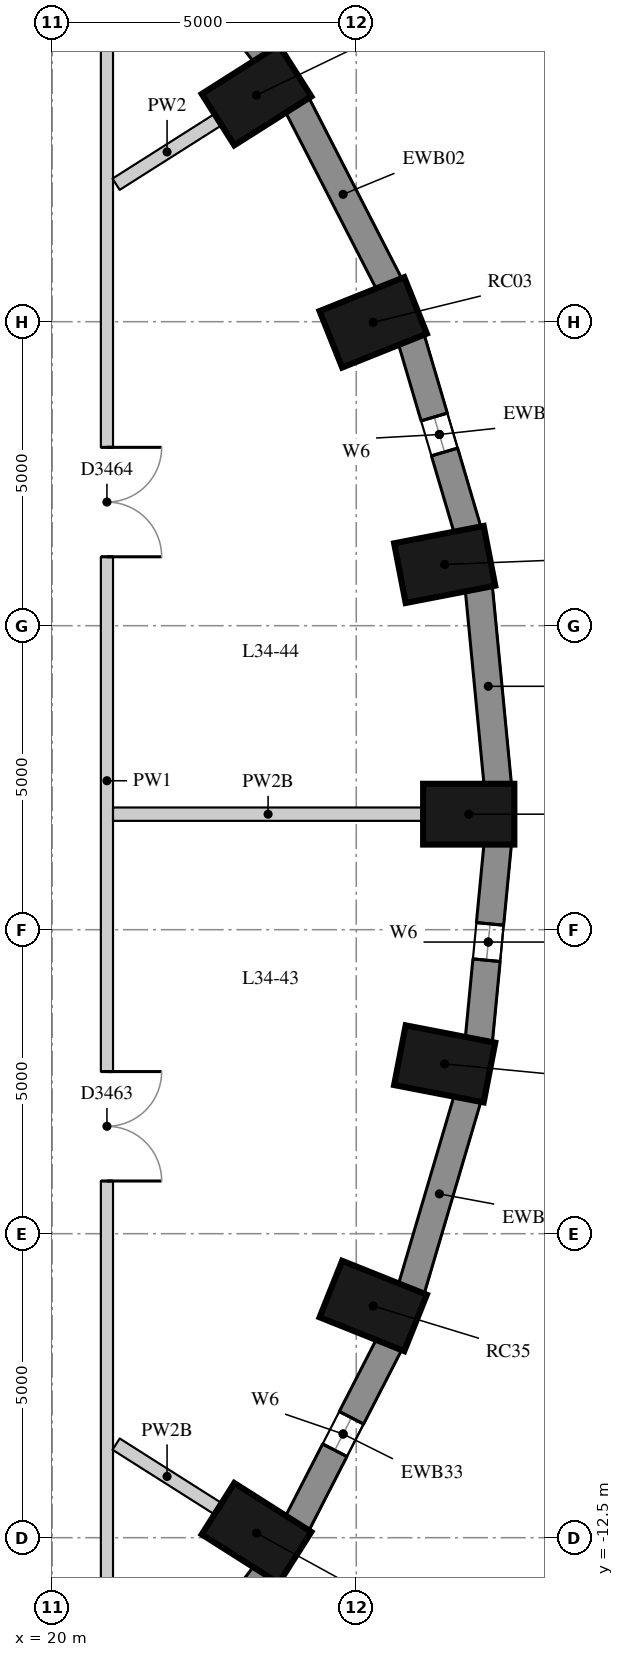
"""IFC4 building model, lengths in metres.
Left out: names, types, materials, properties, quantities, classifications, styles, units other than length and angle.
Written with IfcOpenShell. Run it as: python <this file> out.ifc"""

import sys

from ifc_helpers import new_model, si_unit, direction, frame, frame_2d, origin, origin_2d, place, context, subcontext, project, spatial, rectangle, extrude, element, fill, save


model = new_model("IFC4")
c1 = context("Model", 3, precision=1e-05, world=origin(), true_north=direction((0.0, 1.0)))
c2 = subcontext(c1, "Body", "Model", "MODEL_VIEW")
j1 = project(units=[si_unit("LENGTHUNIT", "METRE"), si_unit("PLANEANGLEUNIT", "RADIAN")], contexts=[c1])
p1 = place(None, origin())
s1 = spatial("IfcSite", under=j1, at=p1, CompositionType="ELEMENT")
p2 = place(p1, origin())
s2 = spatial("IfcBuilding", under=s1, at=p2, CompositionType="ELEMENT")
p3 = place(p2, frame((0.0, 0.0, 121.9)))
s3 = spatial("IfcBuildingStorey", under=s2, at=p3, CompositionType="ELEMENT", Elevation=121.9)
for number, where, z_axis, x_axis in (
    (1, (26.85, -0.6, 0.0), (0.0, 0.0, 1.0), (1.0, 0.0, 0.0)),
    (2, (26.454, 3.507, 0.0), (0.0, 0.0, 1.0), (0.982, 0.19, 0.0)),
    (3, (25.279, 7.489, 0.0), (0.0, 0.0, 1.0), (0.929, 0.371, 0.0)),
    (4, (23.36, 11.225, 0.0), (0.0, 0.0, 1.0), (0.845, 0.536, 0.0)),
    (5, (23.36, -12.425, 0.0), (0.0, 0.0, 1.0), (0.845, -0.536, 0.0)),
    (6, (25.279, -8.689, 0.0), (0.0, 0.0, 1.0), (0.929, -0.371, 0.0)),
    (7, (26.454, -4.707, 0.0), (0.0, 0.0, 1.0), (0.982, -0.19, 0.0)),
):
    element("IfcColumn", number, at=place(p3, frame(where, z_axis=z_axis, x_axis=x_axis)), inside=s3, PredefinedType="COLUMN", context=c2, shape_type="SweptSolid", body=[
        extrude(rectangle(XDim=1.5, YDim=1.0, at=origin_2d()), origin(), (0.0, 0.0, 1.0), 3.3),
    ])
p4 = place(p3, frame((27.328, -0.12, 0.0), z_axis=(0.0, 0.0, 1.0), x_axis=(-0.09589355735, 0.995391594127, 0.0)))
e8 = element("IfcWall", 8, at=p4, inside=s3, PredefinedType="SOLIDWALL", context=c2, shape_type="SweptSolid", body=[
    extrude(rectangle(XDim=3.261, YDim=0.45, at=frame_2d((1.631, 0.0))), origin(), (0.0, 0.0, 1.0), 3.02),
])
p5 = place(p3, frame((26.832, 4.069, 0.0), z_axis=(0.0, 0.0, 1.0), x_axis=(-0.283002902729, 0.959119052593, 0.0)))
e9 = element("IfcWall", 9, at=p5, inside=s3, PredefinedType="SOLIDWALL", context=c2, shape_type="SweptSolid", body=[
    extrude(rectangle(XDim=3.286, YDim=0.45, at=frame_2d((1.643, 0.0))), origin(), (0.0, 0.0, 1.0), 3.02),
])
p6 = place(p5, frame((1.343, 0.0, 0.4)))
e10 = element("IfcOpeningElement", 10, at=p6, cuts=e9, PredefinedType="OPENING", context=c2, shape_type="SweptSolid", body=[
    extrude(rectangle(XDim=0.6, YDim=1.75, at=frame_2d((0.3, 0.875))), frame((0.0, 0.235, 0.0), z_axis=(0.0, -1.0, 0.0), x_axis=(1.0, 0.0, 0.0)), (0.0, 0.0, 1.0), 0.47),
])
p7 = place(p3, frame((25.545, 8.112, 0.0), z_axis=(0.0, 0.0, 1.0), x_axis=(-0.456828186229, 0.889554949549, 0.0)))
e11 = element("IfcWall", 11, at=p7, inside=s3, PredefinedType="SOLIDWALL", context=c2, shape_type="SweptSolid", body=[
    extrude(rectangle(XDim=3.333, YDim=0.45, at=frame_2d((1.667, 0.0))), origin(), (0.0, 0.0, 1.0), 3.02),
])
p8 = place(p3, frame((23.508, 11.887, 0.0), z_axis=(0.0, 0.0, 1.0), x_axis=(-0.610693945156, 0.791866721961, 0.0)))
e12 = element("IfcWall", 12, at=p8, inside=s3, PredefinedType="SOLIDWALL", context=c2, shape_type="SweptSolid", body=[
    extrude(rectangle(XDim=3.395, YDim=0.45, at=frame_2d((1.697, 0.0))), origin(), (0.0, 0.0, 1.0), 3.02),
])
p9 = place(p8, frame((1.397, 0.0, 0.4)))
e13 = element("IfcOpeningElement", 13, at=p9, cuts=e12, PredefinedType="OPENING", context=c2, shape_type="SweptSolid", body=[
    extrude(rectangle(XDim=0.6, YDim=1.75, at=frame_2d((0.3, 0.875))), frame((0.0, 0.235, 0.0), z_axis=(0.0, -1.0, 0.0), x_axis=(1.0, 0.0, 0.0)), (0.0, 0.0, 1.0), 0.47),
])
p10 = place(p3, frame((21.435, -15.775, 0.0), z_axis=(0.0, 0.0, 1.0), x_axis=(0.610693945156, 0.791866721961, 0.0)))
e14 = element("IfcWall", 14, at=p10, inside=s3, PredefinedType="SOLIDWALL", context=c2, shape_type="SweptSolid", body=[
    extrude(rectangle(XDim=3.395, YDim=0.45, at=frame_2d((1.697, 0.0))), origin(), (0.0, 0.0, 1.0), 3.02),
])
p11 = place(p3, frame((24.023, -12.277, 0.0), z_axis=(0.0, 0.0, 1.0), x_axis=(0.456828186229, 0.889554949549, 0.0)))
e15 = element("IfcWall", 15, at=p11, inside=s3, PredefinedType="SOLIDWALL", context=c2, shape_type="SweptSolid", body=[
    extrude(rectangle(XDim=3.333, YDim=0.45, at=frame_2d((1.667, 0.0))), origin(), (0.0, 0.0, 1.0), 3.02),
])
p12 = place(p11, frame((1.366, 0.0, 0.4)))
e16 = element("IfcOpeningElement", 16, at=p12, cuts=e15, PredefinedType="OPENING", context=c2, shape_type="SweptSolid", body=[
    extrude(rectangle(XDim=0.6, YDim=1.75, at=frame_2d((0.3, 0.875))), frame((0.0, 0.235, 0.0), z_axis=(0.0, -1.0, 0.0), x_axis=(1.0, 0.0, 0.0)), (0.0, 0.0, 1.0), 0.47),
])
p13 = place(p3, frame((25.902, -8.421, 0.0), z_axis=(0.0, 0.0, 1.0), x_axis=(0.282982737009, 0.95912500257, 0.0)))
e17 = element("IfcWall", 17, at=p13, inside=s3, PredefinedType="SOLIDWALL", context=c2, shape_type="SweptSolid", body=[
    extrude(rectangle(XDim=3.286, YDim=0.45, at=frame_2d((1.643, 0.0))), origin(), (0.0, 0.0, 1.0), 3.02),
])
p14 = place(p3, frame((27.015, -4.326, 0.0), z_axis=(0.0, 0.0, 1.0), x_axis=(0.09589355735, 0.995391594127, 0.0)))
e18 = element("IfcWall", 18, at=p14, inside=s3, PredefinedType="SOLIDWALL", context=c2, shape_type="SweptSolid", body=[
    extrude(rectangle(XDim=3.261, YDim=0.45, at=frame_2d((1.631, 0.0))), origin(), (0.0, 0.0, 1.0), 3.02),
])
p15 = place(p14, frame((1.331, 0.0, 0.4)))
e19 = element("IfcOpeningElement", 19, at=p15, cuts=e18, PredefinedType="OPENING", context=c2, shape_type="SweptSolid", body=[
    extrude(rectangle(XDim=0.6, YDim=1.75, at=frame_2d((0.3, 0.875))), frame((0.0, 0.235, 0.0), z_axis=(0.0, -1.0, 0.0), x_axis=(1.0, 0.0, 0.0)), (0.0, 0.0, 1.0), 0.47),
])
p16 = place(p3, frame((20.9, 13.6, 0.0), z_axis=(0.0, 0.0, 1.0), x_axis=(0.0, -1.0, 0.0)))
e20 = element("IfcWall", 20, at=p16, inside=s3, PredefinedType="PARTITIONING", context=c2, shape_type="SweptSolid", body=[
    extrude(rectangle(XDim=27.3, YDim=0.2, at=frame_2d((13.65, 0.0))), origin(), (0.0, 0.0, 1.0), 3.02),
])
p17 = place(p16, frame((18.433, 0.0, 0.0)))
e21 = element("IfcOpeningElement", 21, at=p17, cuts=e20, PredefinedType="OPENING", context=c2, shape_type="SweptSolid", body=[
    extrude(rectangle(XDim=1.8, YDim=2.1, at=frame_2d((0.9, 1.05))), frame((0.0, 0.11, 0.0), z_axis=(0.0, -1.0, 0.0), x_axis=(1.0, 0.0, 0.0)), (0.0, 0.0, 1.0), 0.22),
])
p18 = place(p16, frame((8.167, 0.0, 0.0)))
e22 = element("IfcOpeningElement", 22, at=p18, cuts=e20, PredefinedType="OPENING", context=c2, shape_type="SweptSolid", body=[
    extrude(rectangle(XDim=1.8, YDim=2.1, at=frame_2d((0.9, 1.05))), frame((0.0, 0.11, 0.0), z_axis=(0.0, -1.0, 0.0), x_axis=(1.0, 0.0, 0.0)), (0.0, 0.0, 1.0), 0.22),
])
p19 = place(p3, frame((26.1, -0.6, 0.0), z_axis=(0.0, 0.0, 1.0), x_axis=(-1.0, 0.0, 0.0)))
e23 = element("IfcWall", 23, at=p19, inside=s3, PredefinedType="PARTITIONING", context=c2, shape_type="SweptSolid", body=[
    extrude(rectangle(XDim=5.1, YDim=0.22, at=frame_2d((2.55, 0.0))), origin(), (0.0, 0.0, 1.0), 2.57),
])
p20 = place(p3, frame((22.727, 10.823, 0.0), z_axis=(0.0, 0.0, 1.0), x_axis=(-0.844587282199, -0.535417895431, 0.0)))
e24 = element("IfcWall", 24, at=p20, inside=s3, PredefinedType="PARTITIONING", context=c2, shape_type="SweptSolid", body=[
    extrude(rectangle(XDim=1.984, YDim=0.22, at=frame_2d((0.992, 0.0))), origin(), (0.0, 0.0, 1.0), 3.02),
])
p21 = place(p3, frame((22.727, -12.023, 0.0), z_axis=(0.0, 0.0, 1.0), x_axis=(-0.84453164716, 0.535505646044, 0.0)))
e25 = element("IfcWall", 25, at=p21, inside=s3, PredefinedType="PARTITIONING", context=c2, shape_type="SweptSolid", body=[
    extrude(rectangle(XDim=1.985, YDim=0.22, at=frame_2d((0.992, 0.0))), origin(), (0.0, 0.0, 1.0), 2.57),
])
p22 = place(p6, origin())
e26 = element("IfcWindow", 26, at=p22, inside=s3, PartitioningType="SINGLE_PANEL", PredefinedType="WINDOW", context=c2, shape_type="SweptSolid", body=[
    extrude(rectangle(XDim=0.6, YDim=1.75, at=frame_2d((0.3, 0.875))), frame((0.0, 0.035, 0.0), z_axis=(0.0, -1.0, 0.0), x_axis=(1.0, 0.0, 0.0)), (0.0, 0.0, 1.0), 0.06),
])
fill(e10, e26)
p23 = place(p12, origin())
e27 = element("IfcWindow", 27, at=p23, inside=s3, PartitioningType="SINGLE_PANEL", PredefinedType="WINDOW", context=c2, shape_type="SweptSolid", body=[
    extrude(rectangle(XDim=0.6, YDim=1.75, at=frame_2d((0.3, 0.875))), frame((0.0, 0.035, 0.0), z_axis=(0.0, -1.0, 0.0), x_axis=(1.0, 0.0, 0.0)), (0.0, 0.0, 1.0), 0.06),
])
fill(e16, e27)
p24 = place(p15, origin())
e28 = element("IfcWindow", 28, at=p24, inside=s3, PartitioningType="SINGLE_PANEL", PredefinedType="WINDOW", context=c2, shape_type="SweptSolid", body=[
    extrude(rectangle(XDim=0.6, YDim=1.75, at=frame_2d((0.3, 0.875))), frame((0.0, 0.035, 0.0), z_axis=(0.0, -1.0, 0.0), x_axis=(1.0, 0.0, 0.0)), (0.0, 0.0, 1.0), 0.06),
])
fill(e19, e28)
p25 = place(p17, origin())
e29 = element("IfcDoor", 29, at=p25, inside=s3, OperationType="DOUBLE_DOOR_SINGLE_SWING", PredefinedType="DOOR", context=c2, shape_type="SweptSolid", body=[
    extrude(rectangle(XDim=1.8, YDim=2.1, at=frame_2d((0.9, 1.05))), frame((0.0, 0.025, 0.0), z_axis=(0.0, -1.0, 0.0), x_axis=(1.0, 0.0, 0.0)), (0.0, 0.0, 1.0), 0.05),
])
fill(e21, e29)
p26 = place(p18, origin())
e30 = element("IfcDoor", 30, at=p26, inside=s3, OperationType="DOUBLE_DOOR_SINGLE_SWING", PredefinedType="DOOR", context=c2, shape_type="SweptSolid", body=[
    extrude(rectangle(XDim=1.8, YDim=2.1, at=frame_2d((0.9, 1.05))), frame((0.0, 0.025, 0.0), z_axis=(0.0, -1.0, 0.0), x_axis=(1.0, 0.0, 0.0)), (0.0, 0.0, 1.0), 0.05),
])
fill(e22, e30)
save(model, sys.argv[1])
